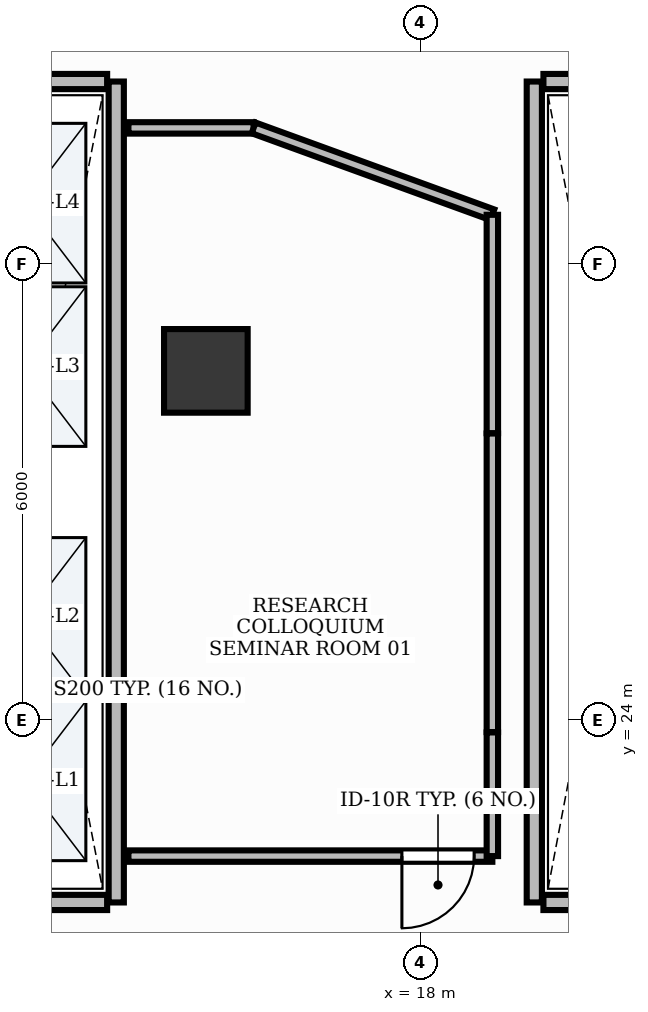
"""IFC4 building model, lengths in metres.
Left out: names, types, materials, properties, quantities, classifications, styles, units other than length and angle.
Written with IfcOpenShell. Run it as: python <this file> out.ifc"""

import sys

from ifc_helpers import new_model, si_unit, direction, frame, frame_2d, origin, origin_2d, place, context, subcontext, project, spatial, rectangle, extrude, element, fill, save


model = new_model("IFC4")
c1 = context("Model", 3, precision=1e-05, world=origin(), true_north=direction((0.0, 1.0)))
c2 = subcontext(c1, "Body", "Model", "MODEL_VIEW")
j1 = project(units=[si_unit("LENGTHUNIT", "METRE"), si_unit("PLANEANGLEUNIT", "RADIAN")], contexts=[c1])
p1 = place(None, origin())
s1 = spatial("IfcSite", under=j1, at=p1, CompositionType="ELEMENT")
p2 = place(p1, origin())
s2 = spatial("IfcBuilding", under=s1, at=p2, CompositionType="ELEMENT")
p3 = place(p2, frame((0.0, 0.0, 46.8)))
s3 = spatial("IfcBuildingStorey", under=s2, at=p3, CompositionType="ELEMENT", Elevation=46.8)
p4 = place(p3, frame((15.179, 28.594, -0.0), z_axis=(0.0, 0.0, 1.0), x_axis=(1.0, 0.0, 0.0)))
e1 = element("IfcColumn", 1, at=p4, inside=s3, PredefinedType="COLUMN", context=c2, shape_type="SweptSolid", body=[
    extrude(rectangle(XDim=1.1, YDim=1.1, at=origin_2d()), origin(), (0.0, 0.0, 1.0), 3.901),
])
p5 = place(p3, frame((14.0, 21.6, 0.0), z_axis=(0.0, 0.0, 1.0), x_axis=(0.0, 1.0, 0.0)))
e2 = element("IfcWall", 2, at=p5, inside=s3, PredefinedType="PARTITIONING", context=c2, shape_type="SweptSolid", body=[
    extrude(rectangle(XDim=10.8, YDim=0.2, at=frame_2d((5.4, 0.0))), origin(), (0.0, 0.0, 1.0), 2.91),
])
for number, where, z_axis, x_axis in (
    (3, (11.72, 21.6, 0.0), (0.0, 0.0, 1.0), (1.0, 0.0, 0.0)),
    (4, (11.72, 32.4, 0.0), (0.0, 0.0, 1.0), (1.0, 0.0, 0.0)),
):
    element("IfcWall", number, at=place(p3, frame(where, z_axis=z_axis, x_axis=x_axis)), inside=s3, PredefinedType="PARTITIONING", context=c2, shape_type="SweptSolid", body=[
        extrude(rectangle(XDim=2.16, YDim=0.2, at=frame_2d((1.08, 0.0))), origin(), (0.0, 0.0, 1.0), 2.91),
    ])
p6 = place(p3, frame((19.5, 21.6, 0.0), z_axis=(0.0, 0.0, 1.0), x_axis=(0.0, 1.0, 0.0)))
e5 = element("IfcWall", 5, at=p6, inside=s3, PredefinedType="PARTITIONING", context=c2, shape_type="SweptSolid", body=[
    extrude(rectangle(XDim=10.8, YDim=0.2, at=frame_2d((5.4, 0.0))), origin(), (0.0, 0.0, 1.0), 2.91),
])
for number, where, z_axis, x_axis in (
    (6, (19.62, 21.6, 0.0), (0.0, 0.0, 1.0), (1.0, 0.0, 0.0)),
    (7, (19.62, 32.4, 0.0), (0.0, 0.0, 1.0), (1.0, 0.0, 0.0)),
):
    element("IfcWall", number, at=place(p3, frame(where, z_axis=z_axis, x_axis=x_axis)), inside=s3, PredefinedType="PARTITIONING", context=c2, shape_type="SweptSolid", body=[
        extrude(rectangle(XDim=2.11, YDim=0.2, at=frame_2d((1.055, 0.0))), origin(), (0.0, 0.0, 1.0), 2.91),
    ])
p7 = place(p3, frame((18.948, 22.21, 0.0), z_axis=(0.0, 0.0, 1.0), x_axis=(-1.0, 0.0, 0.0)))
e8 = element("IfcWall", 8, at=p7, inside=s3, PredefinedType="PARTITIONING", context=c2, shape_type="SweptSolid", body=[
    extrude(rectangle(XDim=4.788, YDim=0.15, at=frame_2d((2.394, 0.0))), origin(), (0.0, 0.0, 1.0), 2.91),
])
p8 = place(p7, frame((0.24, 0.0, 0.0)))
e9 = element("IfcOpeningElement", 9, at=p8, cuts=e8, PredefinedType="OPENING", context=c2, shape_type="SweptSolid", body=[
    extrude(rectangle(XDim=0.95, YDim=2.15, at=frame_2d((0.475, 1.075))), frame((0.0, 0.09, 0.0), z_axis=(0.0, -1.0, 0.0), x_axis=(1.0, 0.0, 0.0)), (0.0, 0.0, 1.0), 0.18),
])
p9 = place(p3, frame((14.16, 31.79, 0.0), z_axis=(0.0, 0.0, 1.0), x_axis=(1.0, 0.0, 0.0)))
e10 = element("IfcWall", 10, at=p9, inside=s3, PredefinedType="PARTITIONING", context=c2, shape_type="SweptSolid", body=[
    extrude(rectangle(XDim=1.647, YDim=0.15, at=frame_2d((0.824, 0.0))), origin(), (0.0, 0.0, 1.0), 2.91),
])
p10 = place(p3, frame((15.807, 31.79, 0.0), z_axis=(0.0, 0.0, 1.0), x_axis=(0.939695275892, -0.342012848393, 0.0)))
e11 = element("IfcWall", 11, at=p10, inside=s3, PredefinedType="PARTITIONING", context=c2, shape_type="SweptSolid", body=[
    extrude(rectangle(XDim=3.342, YDim=0.15, at=frame_2d((1.671, 0.0))), origin(), (0.0, 0.0, 1.0), 2.91),
])
p11 = place(p3, frame((18.948, 30.647, 0.0), z_axis=(0.0, 0.0, 1.0), x_axis=(0.0, -1.0, 0.0)))
e12 = element("IfcWall", 12, at=p11, inside=s3, PredefinedType="PARTITIONING", context=c2, shape_type="SweptSolid", body=[
    extrude(rectangle(XDim=2.873, YDim=0.15, at=frame_2d((1.437, 0.0))), origin(), (0.0, 0.0, 1.0), 2.91),
])
p12 = place(p3, frame((18.948, 27.769, 0.0), z_axis=(0.0, 0.0, 1.0), x_axis=(0.0, -1.0, 0.0)))
e13 = element("IfcWall", 13, at=p12, inside=s3, PredefinedType="PARTITIONING", context=c2, shape_type="SweptSolid", body=[
    extrude(rectangle(XDim=3.928, YDim=0.15, at=frame_2d((1.964, 0.0))), origin(), (0.0, 0.0, 1.0), 2.91),
])
p13 = place(p3, frame((18.948, 23.837, 0.0), z_axis=(0.0, 0.0, 1.0), x_axis=(0.0, -1.0, 0.0)))
e14 = element("IfcWall", 14, at=p13, inside=s3, PredefinedType="PARTITIONING", context=c2, shape_type="SweptSolid", body=[
    extrude(rectangle(XDim=1.627, YDim=0.15, at=frame_2d((0.813, 0.0))), origin(), (0.0, 0.0, 1.0), 2.91),
])
p14 = place(p8, origin())
e15 = element("IfcDoor", 15, at=p14, inside=s3, OperationType="SINGLE_SWING_RIGHT", PredefinedType="DOOR", context=c2, shape_type="SweptSolid", body=[
    extrude(rectangle(XDim=0.95, YDim=2.15, at=frame_2d((0.475, 1.075))), frame((0.0, 0.025, 0.0), z_axis=(0.0, -1.0, 0.0), x_axis=(1.0, 0.0, 0.0)), (0.0, 0.0, 1.0), 0.05),
])
fill(e9, e15)
save(model, sys.argv[1])
